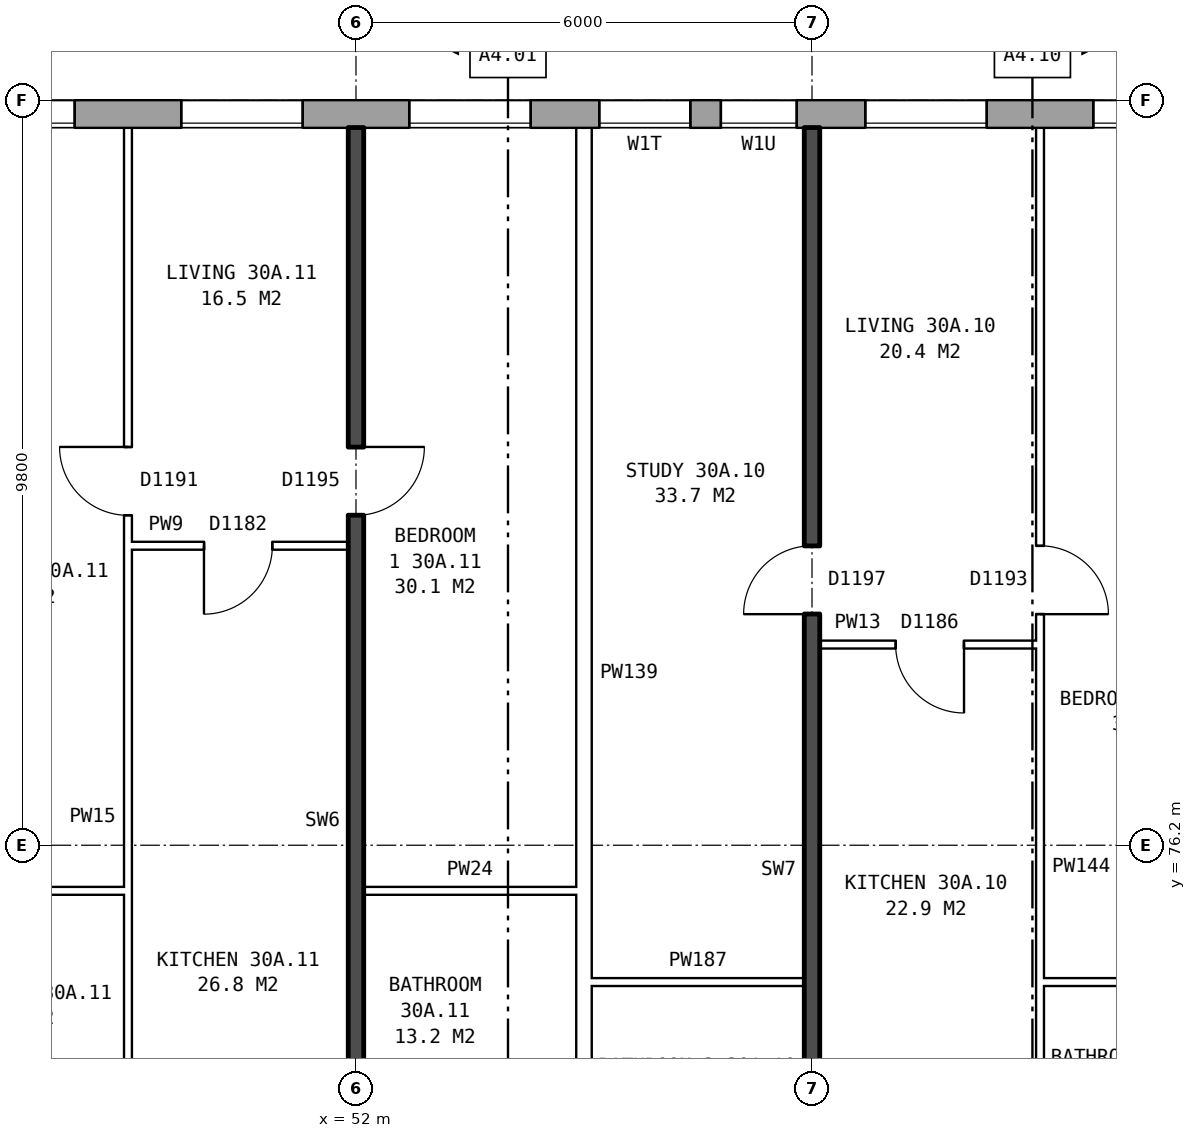
"""IFC4 building model, lengths in metres.
Left out: names, types, materials, properties, quantities, classifications, styles, units other than length and angle.
Written with IfcOpenShell. Run it as: python <this file> out.ifc"""

import sys

from ifc_helpers import new_model, si_unit, direction, frame, frame_2d, origin, place, context, subcontext, project, spatial, rectangle, extrude, element, fill, save


model = new_model("IFC4")
c1 = context("Model", 3, precision=1e-05, world=origin(), true_north=direction((0.0, 1.0)))
c2 = subcontext(c1, "Body", "Model", "MODEL_VIEW")
j1 = project(units=[si_unit("LENGTHUNIT", "METRE"), si_unit("PLANEANGLEUNIT", "RADIAN")], contexts=[c1])
p1 = place(None, origin())
s1 = spatial("IfcSite", under=j1, at=p1, CompositionType="ELEMENT")
p2 = place(p1, origin())
s2 = spatial("IfcBuilding", under=s1, at=p2, CompositionType="ELEMENT")
p3 = place(p2, frame((0.0, 0.0, 108.8)))
s3 = spatial("IfcBuildingStorey", under=s2, at=p3, CompositionType="ELEMENT", Elevation=108.8)
p4 = place(p3, frame((72.925, 85.82, 0.0), z_axis=(0.0, 0.0, 1.0), x_axis=(-1.0, 0.0, 0.0)))
e1 = element("IfcWall", 1, at=p4, inside=s3, PredefinedType="STANDARD", context=c2, shape_type="SweptSolid", body=[
    extrude(rectangle(XDim=44.851, YDim=0.36, at=frame_2d((22.425, 0.0))), origin(), (0.0, 0.0, 1.0), 2.85),
])
p5 = place(p4, frame((0.625, 0.0, 0.8)))
e2 = element("IfcOpeningElement", 2, at=p5, cuts=e1, PredefinedType="OPENING", context=c2, shape_type="SweptSolid", body=[
    extrude(rectangle(XDim=1.6, YDim=1.8, at=frame_2d((0.8, 0.9))), frame((0.0, 0.19, 0.0), z_axis=(0.0, -1.0, 0.0), x_axis=(1.0, 0.0, 0.0)), (0.0, 0.0, 1.0), 0.38),
])
p6 = place(p4, frame((3.625, 0.0, 0.8)))
e3 = element("IfcOpeningElement", 3, at=p6, cuts=e1, PredefinedType="OPENING", context=c2, shape_type="SweptSolid", body=[
    extrude(rectangle(XDim=1.6, YDim=1.8, at=frame_2d((0.8, 0.9))), frame((0.0, 0.19, 0.0), z_axis=(0.0, -1.0, 0.0), x_axis=(1.0, 0.0, 0.0)), (0.0, 0.0, 1.0), 0.38),
])
p7 = place(p4, frame((6.625, 0.0, 0.8)))
e4 = element("IfcOpeningElement", 4, at=p7, cuts=e1, PredefinedType="OPENING", context=c2, shape_type="SweptSolid", body=[
    extrude(rectangle(XDim=1.6, YDim=1.8, at=frame_2d((0.8, 0.9))), frame((0.0, 0.19, 0.0), z_axis=(0.0, -1.0, 0.0), x_axis=(1.0, 0.0, 0.0)), (0.0, 0.0, 1.0), 0.38),
])
p8 = place(p4, frame((9.625, 0.0, 0.8)))
e5 = element("IfcOpeningElement", 5, at=p8, cuts=e1, PredefinedType="OPENING", context=c2, shape_type="SweptSolid", body=[
    extrude(rectangle(XDim=1.6, YDim=1.8, at=frame_2d((0.8, 0.9))), frame((0.0, 0.19, 0.0), z_axis=(0.0, -1.0, 0.0), x_axis=(1.0, 0.0, 0.0)), (0.0, 0.0, 1.0), 0.38),
])
p9 = place(p4, frame((12.625, 0.0, 0.8)))
e6 = element("IfcOpeningElement", 6, at=p9, cuts=e1, PredefinedType="OPENING", context=c2, shape_type="SweptSolid", body=[
    extrude(rectangle(XDim=1.6, YDim=1.8, at=frame_2d((0.8, 0.9))), frame((0.0, 0.19, 0.0), z_axis=(0.0, -1.0, 0.0), x_axis=(1.0, 0.0, 0.0)), (0.0, 0.0, 1.0), 0.38),
])
p10 = place(p4, frame((15.125, 0.0, 1.65)))
e7 = element("IfcOpeningElement", 7, at=p10, cuts=e1, PredefinedType="OPENING", context=c2, shape_type="SweptSolid", body=[
    extrude(rectangle(XDim=1.0, YDim=0.9, at=frame_2d((0.5, 0.45))), frame((0.0, 0.19, 0.0), z_axis=(0.0, -1.0, 0.0), x_axis=(1.0, 0.0, 0.0)), (0.0, 0.0, 1.0), 0.38),
])
p11 = place(p4, frame((18.625, 0.0, 0.8)))
e8 = element("IfcOpeningElement", 8, at=p11, cuts=e1, PredefinedType="OPENING", context=c2, shape_type="SweptSolid", body=[
    extrude(rectangle(XDim=1.6, YDim=1.8, at=frame_2d((0.8, 0.9))), frame((0.0, 0.19, 0.0), z_axis=(0.0, -1.0, 0.0), x_axis=(1.0, 0.0, 0.0)), (0.0, 0.0, 1.0), 0.38),
])
p12 = place(p4, frame((21.625, 0.0, 0.8)))
e9 = element("IfcOpeningElement", 9, at=p12, cuts=e1, PredefinedType="OPENING", context=c2, shape_type="SweptSolid", body=[
    extrude(rectangle(XDim=1.6, YDim=1.8, at=frame_2d((0.8, 0.9))), frame((0.0, 0.19, 0.0), z_axis=(0.0, -1.0, 0.0), x_axis=(1.0, 0.0, 0.0)), (0.0, 0.0, 1.0), 0.38),
])
p13 = place(p4, frame((24.625, 0.0, 0.8)))
e10 = element("IfcOpeningElement", 10, at=p13, cuts=e1, PredefinedType="OPENING", context=c2, shape_type="SweptSolid", body=[
    extrude(rectangle(XDim=1.6, YDim=1.8, at=frame_2d((0.8, 0.9))), frame((0.0, 0.19, 0.0), z_axis=(0.0, -1.0, 0.0), x_axis=(1.0, 0.0, 0.0)), (0.0, 0.0, 1.0), 0.38),
])
p14 = place(p4, frame((29.075, 0.0, 1.4)))
e11 = element("IfcOpeningElement", 11, at=p14, cuts=e1, PredefinedType="OPENING", context=c2, shape_type="SweptSolid", body=[
    extrude(rectangle(XDim=1.2, YDim=1.2, at=frame_2d((0.6, 0.6))), frame((0.0, 0.19, 0.0), z_axis=(0.0, -1.0, 0.0), x_axis=(1.0, 0.0, 0.0)), (0.0, 0.0, 1.0), 0.38),
])
p15 = place(p4, frame((30.625, 0.0, 0.8)))
e12 = element("IfcOpeningElement", 12, at=p15, cuts=e1, PredefinedType="OPENING", context=c2, shape_type="SweptSolid", body=[
    extrude(rectangle(XDim=1.6, YDim=1.8, at=frame_2d((0.8, 0.9))), frame((0.0, 0.19, 0.0), z_axis=(0.0, -1.0, 0.0), x_axis=(1.0, 0.0, 0.0)), (0.0, 0.0, 1.0), 0.38),
])
p16 = place(p4, frame((33.625, 0.0, 0.8)))
e13 = element("IfcOpeningElement", 13, at=p16, cuts=e1, PredefinedType="OPENING", context=c2, shape_type="SweptSolid", body=[
    extrude(rectangle(XDim=1.6, YDim=1.8, at=frame_2d((0.8, 0.9))), frame((0.0, 0.19, 0.0), z_axis=(0.0, -1.0, 0.0), x_axis=(1.0, 0.0, 0.0)), (0.0, 0.0, 1.0), 0.38),
])
p17 = place(p4, frame((36.625, 0.0, 0.8)))
e14 = element("IfcOpeningElement", 14, at=p17, cuts=e1, PredefinedType="OPENING", context=c2, shape_type="SweptSolid", body=[
    extrude(rectangle(XDim=1.6, YDim=1.8, at=frame_2d((0.8, 0.9))), frame((0.0, 0.19, 0.0), z_axis=(0.0, -1.0, 0.0), x_axis=(1.0, 0.0, 0.0)), (0.0, 0.0, 1.0), 0.38),
])
p18 = place(p4, frame((39.625, 0.0, 0.8)))
e15 = element("IfcOpeningElement", 15, at=p18, cuts=e1, PredefinedType="OPENING", context=c2, shape_type="SweptSolid", body=[
    extrude(rectangle(XDim=1.6, YDim=1.8, at=frame_2d((0.8, 0.9))), frame((0.0, 0.19, 0.0), z_axis=(0.0, -1.0, 0.0), x_axis=(1.0, 0.0, 0.0)), (0.0, 0.0, 1.0), 0.38),
])
p19 = place(p4, frame((42.625, 0.0, 0.8)))
e16 = element("IfcOpeningElement", 16, at=p19, cuts=e1, PredefinedType="OPENING", context=c2, shape_type="SweptSolid", body=[
    extrude(rectangle(XDim=1.6, YDim=1.8, at=frame_2d((0.8, 0.9))), frame((0.0, 0.19, 0.0), z_axis=(0.0, -1.0, 0.0), x_axis=(1.0, 0.0, 0.0)), (0.0, 0.0, 1.0), 0.38),
])
p20 = place(p4, frame((16.525, 0.0, 0.15)))
e17 = element("IfcOpeningElement", 17, at=p20, cuts=e1, PredefinedType="OPENING", context=c2, shape_type="SweptSolid", body=[
    extrude(rectangle(XDim=1.2, YDim=0.9, at=frame_2d((0.6, 0.45))), frame((0.0, 0.19, 0.0), z_axis=(0.0, -1.0, 0.0), x_axis=(1.0, 0.0, 0.0)), (0.0, 0.0, 1.0), 0.38),
])
p21 = place(p3, frame((55.1, 74.4, 0.0), z_axis=(0.0, 0.0, 1.0), x_axis=(1.0, 0.0, 0.0)))
e18 = element("IfcWall", 18, at=p21, inside=s3, PredefinedType="PARTITIONING", context=c2, shape_type="SweptSolid", body=[
    extrude(rectangle(XDim=2.8, YDim=0.1, at=frame_2d((1.4, 0.0))), origin(), (0.0, 0.0, 1.0), 2.85),
])
p22 = place(p3, frame((61.0, 74.4, 0.0), z_axis=(0.0, 0.0, 1.0), x_axis=(1.0, 0.0, 0.0)))
e19 = element("IfcWall", 19, at=p22, inside=s3, PredefinedType="PARTITIONING", context=c2, shape_type="SweptSolid", body=[
    extrude(rectangle(XDim=2.64, YDim=0.1, at=frame_2d((1.32, 0.0))), origin(), (0.0, 0.0, 1.0), 2.85),
])
p23 = place(p3, frame((46.1, 75.6, 0.0), z_axis=(0.0, 0.0, 1.0), x_axis=(1.0, 0.0, 0.0)))
e20 = element("IfcWall", 20, at=p23, inside=s3, PredefinedType="PARTITIONING", context=c2, shape_type="SweptSolid", body=[
    extrude(rectangle(XDim=2.9, YDim=0.1, at=frame_2d((1.45, 0.0))), origin(), (0.0, 0.0, 1.0), 2.85),
])
p24 = place(p3, frame((52.1, 75.6, 0.0), z_axis=(0.0, 0.0, 1.0), x_axis=(1.0, 0.0, 0.0)))
e21 = element("IfcWall", 21, at=p24, inside=s3, PredefinedType="PARTITIONING", context=c2, shape_type="SweptSolid", body=[
    extrude(rectangle(XDim=2.8, YDim=0.1, at=frame_2d((1.4, 0.0))), origin(), (0.0, 0.0, 1.0), 2.85),
])
p25 = place(p3, frame((58.1, 78.84, 0.0), z_axis=(0.0, 0.0, 1.0), x_axis=(1.0, 0.0, 0.0)))
e22 = element("IfcWall", 22, at=p25, inside=s3, PredefinedType="PARTITIONING", context=c2, shape_type="SweptSolid", body=[
    extrude(rectangle(XDim=2.9, YDim=0.1, at=frame_2d((1.45, 0.0))), origin(), (0.0, 0.0, 1.0), 2.85),
])
p26 = place(p25, frame((1.0, 0.0, 0.0)))
e23 = element("IfcOpeningElement", 23, at=p26, cuts=e22, PredefinedType="OPENING", context=c2, shape_type="SweptSolid", body=[
    extrude(rectangle(XDim=0.9, YDim=2.1, at=frame_2d((0.45, 1.05))), frame((0.0, 0.06, 0.0), z_axis=(0.0, -1.0, 0.0), x_axis=(1.0, 0.0, 0.0)), (0.0, 0.0, 1.0), 0.12),
])
p27 = place(p3, frame((49.0, 80.14, 0.0), z_axis=(0.0, 0.0, 1.0), x_axis=(1.0, 0.0, 0.0)))
e24 = element("IfcWall", 24, at=p27, inside=s3, PredefinedType="PARTITIONING", context=c2, shape_type="SweptSolid", body=[
    extrude(rectangle(XDim=2.9, YDim=0.1, at=frame_2d((1.45, 0.0))), origin(), (0.0, 0.0, 1.0), 2.85),
])
p28 = place(p27, frame((1.0, 0.0, 0.0)))
e25 = element("IfcOpeningElement", 25, at=p28, cuts=e24, PredefinedType="OPENING", context=c2, shape_type="SweptSolid", body=[
    extrude(rectangle(XDim=0.9, YDim=2.1, at=frame_2d((0.45, 1.05))), frame((0.0, 0.06, 0.0), z_axis=(0.0, -1.0, 0.0), x_axis=(1.0, 0.0, 0.0)), (0.0, 0.0, 1.0), 0.12),
])
p29 = place(p3, frame((49.0, 71.3, 0.0), z_axis=(0.0, 0.0, 1.0), x_axis=(0.0, 1.0, 0.0)))
e26 = element("IfcWall", 26, at=p29, inside=s3, PredefinedType="PARTITIONING", context=c2, shape_type="SweptSolid", body=[
    extrude(rectangle(XDim=14.34, YDim=0.1, at=frame_2d((7.17, 0.0))), origin(), (0.0, 0.0, 1.0), 2.85),
])
p30 = place(p29, frame((9.24, 0.0, 0.0)))
e27 = element("IfcOpeningElement", 27, at=p30, cuts=e26, PredefinedType="OPENING", context=c2, shape_type="SweptSolid", body=[
    extrude(rectangle(XDim=0.9, YDim=2.1, at=frame_2d((0.45, 1.05))), frame((0.0, 0.06, 0.0), z_axis=(0.0, -1.0, 0.0), x_axis=(1.0, 0.0, 0.0)), (0.0, 0.0, 1.0), 0.12),
])
p31 = place(p29, frame((0.4, 0.0, 0.0)))
e28 = element("IfcOpeningElement", 28, at=p31, cuts=e26, PredefinedType="OPENING", context=c2, shape_type="SweptSolid", body=[
    extrude(rectangle(XDim=0.9, YDim=2.1, at=frame_2d((0.45, 1.05))), frame((0.0, 0.06, 0.0), z_axis=(0.0, -1.0, 0.0), x_axis=(1.0, 0.0, 0.0)), (0.0, 0.0, 1.0), 0.12),
])
p32 = place(p3, frame((52.0, 71.2, 0.0), z_axis=(0.0, 0.0, 1.0), x_axis=(0.0, 1.0, 0.0)))
e29 = element("IfcWall", 29, at=p32, inside=s3, PredefinedType="SOLIDWALL", context=c2, shape_type="SweptSolid", body=[
    extrude(rectangle(XDim=14.44, YDim=0.2, at=frame_2d((7.22, 0.0))), origin(), (0.0, 0.0, 1.0), 2.85),
])
p33 = place(p32, frame((9.34, 0.0, 0.0)))
e30 = element("IfcOpeningElement", 30, at=p33, cuts=e29, PredefinedType="OPENING", context=c2, shape_type="SweptSolid", body=[
    extrude(rectangle(XDim=0.9, YDim=2.1, at=frame_2d((0.45, 1.05))), frame((0.0, 0.11, 0.0), z_axis=(0.0, -1.0, 0.0), x_axis=(1.0, 0.0, 0.0)), (0.0, 0.0, 1.0), 0.22),
])
p34 = place(p32, frame((0.4, 0.0, 0.0)))
e31 = element("IfcOpeningElement", 31, at=p34, cuts=e29, PredefinedType="OPENING", context=c2, shape_type="SweptSolid", body=[
    extrude(rectangle(XDim=0.9, YDim=2.1, at=frame_2d((0.45, 1.05))), frame((0.0, 0.11, 0.0), z_axis=(0.0, -1.0, 0.0), x_axis=(1.0, 0.0, 0.0)), (0.0, 0.0, 1.0), 0.22),
])
p35 = place(p3, frame((55.0, 71.3, 0.0), z_axis=(0.0, 0.0, 1.0), x_axis=(0.0, 1.0, 0.0)))
e32 = element("IfcWall", 32, at=p35, inside=s3, PredefinedType="PARTITIONING", context=c2, shape_type="SweptSolid", body=[
    extrude(rectangle(XDim=14.34, YDim=0.2, at=frame_2d((7.17, 0.0))), origin(), (0.0, 0.0, 1.0), 2.85),
])
p36 = place(p3, frame((58.0, 71.2, 0.0), z_axis=(0.0, 0.0, 1.0), x_axis=(0.0, 1.0, 0.0)))
e33 = element("IfcWall", 33, at=p36, inside=s3, PredefinedType="SOLIDWALL", context=c2, shape_type="SweptSolid", body=[
    extrude(rectangle(XDim=14.44, YDim=0.2, at=frame_2d((7.22, 0.0))), origin(), (0.0, 0.0, 1.0), 2.85),
])
p37 = place(p36, frame((8.04, 0.0, 0.0)))
e34 = element("IfcOpeningElement", 34, at=p37, cuts=e33, PredefinedType="OPENING", context=c2, shape_type="SweptSolid", body=[
    extrude(rectangle(XDim=0.9, YDim=2.1, at=frame_2d((0.45, 1.05))), frame((0.0, 0.11, 0.0), z_axis=(0.0, -1.0, 0.0), x_axis=(1.0, 0.0, 0.0)), (0.0, 0.0, 1.0), 0.22),
])
p38 = place(p36, frame((0.4, 0.0, 0.0)))
e35 = element("IfcOpeningElement", 35, at=p38, cuts=e33, PredefinedType="OPENING", context=c2, shape_type="SweptSolid", body=[
    extrude(rectangle(XDim=0.9, YDim=2.1, at=frame_2d((0.45, 1.05))), frame((0.0, 0.11, 0.0), z_axis=(0.0, -1.0, 0.0), x_axis=(1.0, 0.0, 0.0)), (0.0, 0.0, 1.0), 0.22),
])
p39 = place(p3, frame((61.0, 71.3, 0.0), z_axis=(0.0, 0.0, 1.0), x_axis=(0.0, 1.0, 0.0)))
e36 = element("IfcWall", 36, at=p39, inside=s3, PredefinedType="PARTITIONING", context=c2, shape_type="SweptSolid", body=[
    extrude(rectangle(XDim=14.34, YDim=0.1, at=frame_2d((7.17, 0.0))), origin(), (0.0, 0.0, 1.0), 2.85),
])
p40 = place(p39, frame((7.94, 0.0, 0.0)))
e37 = element("IfcOpeningElement", 37, at=p40, cuts=e36, PredefinedType="OPENING", context=c2, shape_type="SweptSolid", body=[
    extrude(rectangle(XDim=0.9, YDim=2.1, at=frame_2d((0.45, 1.05))), frame((0.0, 0.06, 0.0), z_axis=(0.0, -1.0, 0.0), x_axis=(1.0, 0.0, 0.0)), (0.0, 0.0, 1.0), 0.12),
])
p41 = place(p39, frame((0.4, 0.0, 0.0)))
e38 = element("IfcOpeningElement", 38, at=p41, cuts=e36, PredefinedType="OPENING", context=c2, shape_type="SweptSolid", body=[
    extrude(rectangle(XDim=0.9, YDim=2.1, at=frame_2d((0.45, 1.05))), frame((0.0, 0.06, 0.0), z_axis=(0.0, -1.0, 0.0), x_axis=(1.0, 0.0, 0.0)), (0.0, 0.0, 1.0), 0.12),
])
p42 = place(p8, origin())
e39 = element("IfcWindow", 39, at=p42, inside=s3, PartitioningType="SINGLE_PANEL", PredefinedType="WINDOW", context=c2, shape_type="SweptSolid", body=[
    extrude(rectangle(XDim=1.6, YDim=1.8, at=frame_2d((0.8, 0.9))), frame((0.0, 0.15, 0.0), z_axis=(0.0, -1.0, 0.0), x_axis=(1.0, 0.0, 0.0)), (0.0, 0.0, 1.0), 0.06),
])
fill(e5, e39)
p43 = place(p9, origin())
e40 = element("IfcWindow", 40, at=p43, inside=s3, PartitioningType="SINGLE_PANEL", PredefinedType="WINDOW", context=c2, shape_type="SweptSolid", body=[
    extrude(rectangle(XDim=1.6, YDim=1.8, at=frame_2d((0.8, 0.9))), frame((0.0, 0.15, 0.0), z_axis=(0.0, -1.0, 0.0), x_axis=(1.0, 0.0, 0.0)), (0.0, 0.0, 1.0), 0.06),
])
fill(e6, e40)
p44 = place(p10, origin())
e41 = element("IfcWindow", 41, at=p44, inside=s3, PartitioningType="SINGLE_PANEL", PredefinedType="WINDOW", context=c2, shape_type="SweptSolid", body=[
    extrude(rectangle(XDim=1.0, YDim=0.9, at=frame_2d((0.5, 0.45))), frame((0.0, 0.15, 0.0), z_axis=(0.0, -1.0, 0.0), x_axis=(1.0, 0.0, 0.0)), (0.0, 0.0, 1.0), 0.06),
])
fill(e7, e41)
p45 = place(p11, origin())
e42 = element("IfcWindow", 42, at=p45, inside=s3, PartitioningType="SINGLE_PANEL", PredefinedType="WINDOW", context=c2, shape_type="SweptSolid", body=[
    extrude(rectangle(XDim=1.6, YDim=1.8, at=frame_2d((0.8, 0.9))), frame((0.0, 0.15, 0.0), z_axis=(0.0, -1.0, 0.0), x_axis=(1.0, 0.0, 0.0)), (0.0, 0.0, 1.0), 0.06),
])
fill(e8, e42)
p46 = place(p12, origin())
e43 = element("IfcWindow", 43, at=p46, inside=s3, PartitioningType="SINGLE_PANEL", PredefinedType="WINDOW", context=c2, shape_type="SweptSolid", body=[
    extrude(rectangle(XDim=1.6, YDim=1.8, at=frame_2d((0.8, 0.9))), frame((0.0, 0.15, 0.0), z_axis=(0.0, -1.0, 0.0), x_axis=(1.0, 0.0, 0.0)), (0.0, 0.0, 1.0), 0.06),
])
fill(e9, e43)
p47 = place(p13, origin())
e44 = element("IfcWindow", 44, at=p47, inside=s3, PartitioningType="SINGLE_PANEL", PredefinedType="WINDOW", context=c2, shape_type="SweptSolid", body=[
    extrude(rectangle(XDim=1.6, YDim=1.8, at=frame_2d((0.8, 0.9))), frame((0.0, 0.15, 0.0), z_axis=(0.0, -1.0, 0.0), x_axis=(1.0, 0.0, 0.0)), (0.0, 0.0, 1.0), 0.06),
])
fill(e10, e44)
p48 = place(p40, frame((0.9, 0.0, 0.0), z_axis=(0.0, 0.0, 1.0), x_axis=(-1.0, 0.0, 0.0)))
e45 = element("IfcDoor", 45, at=p48, inside=s3, OperationType="SINGLE_SWING_RIGHT", PredefinedType="DOOR", context=c2, shape_type="SweptSolid", body=[
    extrude(rectangle(XDim=0.9, YDim=2.1, at=frame_2d((0.45, 1.05))), frame((0.0, 0.025, 0.0), z_axis=(0.0, -1.0, 0.0), x_axis=(1.0, 0.0, 0.0)), (0.0, 0.0, 1.0), 0.05),
])
fill(e37, e45)
p49 = place(p37, origin())
e46 = element("IfcDoor", 46, at=p49, inside=s3, OperationType="SINGLE_SWING_LEFT", PredefinedType="DOOR", context=c2, shape_type="SweptSolid", body=[
    extrude(rectangle(XDim=0.9, YDim=2.1, at=frame_2d((0.45, 1.05))), frame((0.0, 0.025, 0.0), z_axis=(0.0, -1.0, 0.0), x_axis=(1.0, 0.0, 0.0)), (0.0, 0.0, 1.0), 0.05),
])
fill(e34, e46)
p50 = place(p26, frame((0.9, 0.0, 0.0), z_axis=(0.0, 0.0, 1.0), x_axis=(-1.0, 0.0, 0.0)))
e47 = element("IfcDoor", 47, at=p50, inside=s3, OperationType="SINGLE_SWING_LEFT", PredefinedType="DOOR", context=c2, shape_type="SweptSolid", body=[
    extrude(rectangle(XDim=0.9, YDim=2.1, at=frame_2d((0.45, 1.05))), frame((0.0, 0.025, 0.0), z_axis=(0.0, -1.0, 0.0), x_axis=(1.0, 0.0, 0.0)), (0.0, 0.0, 1.0), 0.05),
])
fill(e23, e47)
p51 = place(p33, frame((0.9, 0.0, 0.0), z_axis=(0.0, 0.0, 1.0), x_axis=(-1.0, 0.0, 0.0)))
e48 = element("IfcDoor", 48, at=p51, inside=s3, OperationType="SINGLE_SWING_LEFT", PredefinedType="DOOR", context=c2, shape_type="SweptSolid", body=[
    extrude(rectangle(XDim=0.9, YDim=2.1, at=frame_2d((0.45, 1.05))), frame((0.0, 0.025, 0.0), z_axis=(0.0, -1.0, 0.0), x_axis=(1.0, 0.0, 0.0)), (0.0, 0.0, 1.0), 0.05),
])
fill(e30, e48)
p52 = place(p30, origin())
e49 = element("IfcDoor", 49, at=p52, inside=s3, OperationType="SINGLE_SWING_RIGHT", PredefinedType="DOOR", context=c2, shape_type="SweptSolid", body=[
    extrude(rectangle(XDim=0.9, YDim=2.1, at=frame_2d((0.45, 1.05))), frame((0.0, 0.025, 0.0), z_axis=(0.0, -1.0, 0.0), x_axis=(1.0, 0.0, 0.0)), (0.0, 0.0, 1.0), 0.05),
])
fill(e27, e49)
p53 = place(p28, frame((0.9, 0.0, 0.0), z_axis=(0.0, 0.0, 1.0), x_axis=(-1.0, 0.0, 0.0)))
e50 = element("IfcDoor", 50, at=p53, inside=s3, OperationType="SINGLE_SWING_RIGHT", PredefinedType="DOOR", context=c2, shape_type="SweptSolid", body=[
    extrude(rectangle(XDim=0.9, YDim=2.1, at=frame_2d((0.45, 1.05))), frame((0.0, 0.025, 0.0), z_axis=(0.0, -1.0, 0.0), x_axis=(1.0, 0.0, 0.0)), (0.0, 0.0, 1.0), 0.05),
])
fill(e25, e50)
p54 = place(p20, origin())
e51 = element("IfcWindow", 51, at=p54, inside=s3, PartitioningType="SINGLE_PANEL", PredefinedType="WINDOW", context=c2, shape_type="SweptSolid", body=[
    extrude(rectangle(XDim=1.2, YDim=0.9, at=frame_2d((0.6, 0.45))), frame((0.0, 0.15, 0.0), z_axis=(0.0, -1.0, 0.0), x_axis=(1.0, 0.0, 0.0)), (0.0, 0.0, 1.0), 0.06),
])
fill(e17, e51)
save(model, sys.argv[1])
